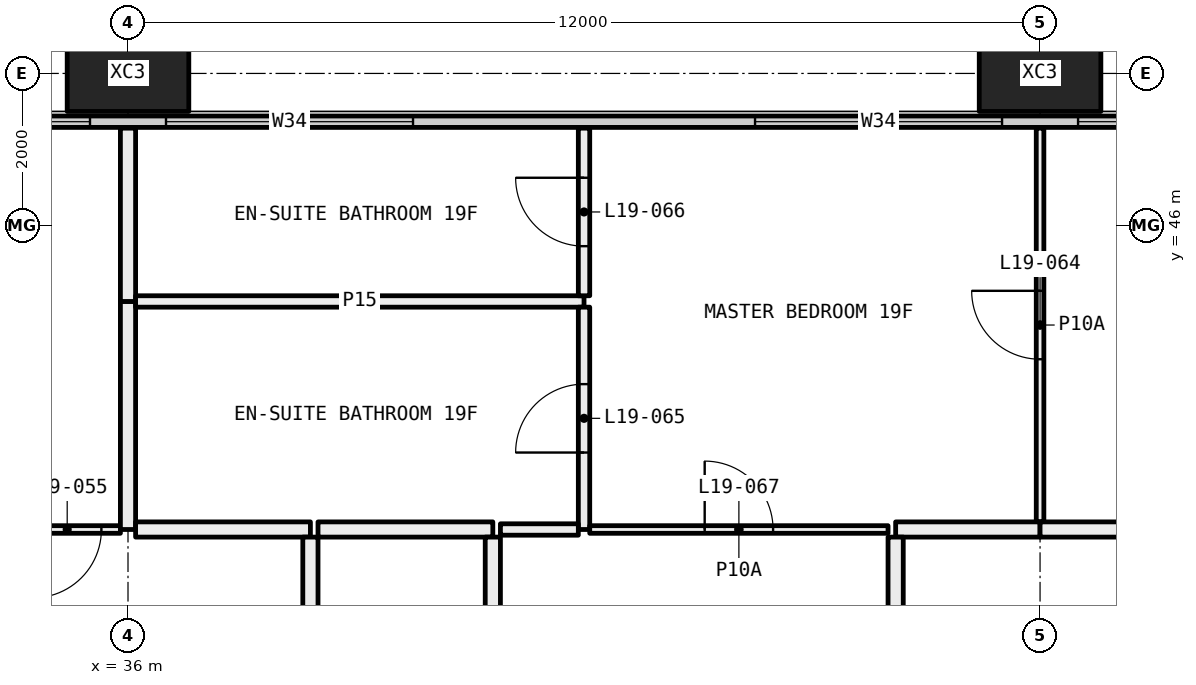
"""IFC4 building model, lengths in metres.
Left out: names, types, materials, properties, quantities, classifications, styles, units other than length and angle.
Written with IfcOpenShell. Run it as: python <this file> out.ifc"""

import sys

from ifc_helpers import new_model, si_unit, direction, frame, frame_2d, origin, origin_2d, place, context, subcontext, project, spatial, rectangle, hollow_rectangle, extrude, element, fill, save


model = new_model("IFC4")
c1 = context("Model", 3, precision=1e-05, world=origin(), true_north=direction((0.0, 1.0)))
c2 = subcontext(c1, "Body", "Model", "MODEL_VIEW")
j1 = project(units=[si_unit("LENGTHUNIT", "METRE"), si_unit("PLANEANGLEUNIT", "RADIAN")], contexts=[c1])
p1 = place(None, origin())
s1 = spatial("IfcSite", under=j1, at=p1, CompositionType="ELEMENT")
p2 = place(p1, origin())
s2 = spatial("IfcBuilding", under=s1, at=p2, CompositionType="ELEMENT")
p3 = place(p2, frame((0.0, 0.0, 78.3)))
s3 = spatial("IfcBuildingStorey", under=s2, at=p3, CompositionType="ELEMENT", Elevation=78.3)
for number, where, z_axis, x_axis in (
    (1, (36.0, 48.0, -0.4), (0.0, 0.0, 1.0), (1.0, 0.0, 0.0)),
    (2, (48.0, 48.0, -0.4), (0.0, 0.0, 1.0), (1.0, 0.0, 0.0)),
):
    element("IfcColumn", number, at=place(p3, frame(where, z_axis=z_axis, x_axis=x_axis)), inside=s3, PredefinedType="COLUMN", context=c2, shape_type="SweptSolid", body=[
        extrude(hollow_rectangle(XDim=1.6, YDim=1.0, WallThickness=0.065, at=origin_2d()), origin(), (0.0, 0.0, 1.0), 3.45),
    ])
p4 = place(p3, frame((6.56, 47.365, 0.0), z_axis=(0.0, 0.0, 1.0), x_axis=(1.0, 0.0, 0.0)))
e3 = element("IfcWall", 3, at=p4, inside=s3, PredefinedType="ELEMENTEDWALL", context=c2, shape_type="SweptSolid", body=[
    extrude(rectangle(XDim=58.88, YDim=0.15, at=frame_2d((29.44, 0.0))), origin(), (0.0, 0.0, 1.0), 3.05),
])
p5 = place(p4, frame((0.44, 0.0, 0.45)))
e4 = element("IfcOpeningElement", 4, at=p5, cuts=e3, PredefinedType="OPENING", context=c2, shape_type="SweptSolid", body=[
    extrude(rectangle(XDim=4.5, YDim=2.55, at=frame_2d((2.25, 1.275))), frame((0.0, 0.085, 0.0), z_axis=(0.0, -1.0, 0.0), x_axis=(1.0, 0.0, 0.0)), (0.0, 0.0, 1.0), 0.17),
])
p6 = place(p4, frame((5.94, 0.0, 0.45)))
e5 = element("IfcOpeningElement", 5, at=p6, cuts=e3, PredefinedType="OPENING", context=c2, shape_type="SweptSolid", body=[
    extrude(rectangle(XDim=3.25, YDim=2.55, at=frame_2d((1.625, 1.275))), frame((0.0, 0.085, 0.0), z_axis=(0.0, -1.0, 0.0), x_axis=(1.0, 0.0, 0.0)), (0.0, 0.0, 1.0), 0.17),
])
p7 = place(p4, frame((13.69, 0.0, 0.45)))
e6 = element("IfcOpeningElement", 6, at=p7, cuts=e3, PredefinedType="OPENING", context=c2, shape_type="SweptSolid", body=[
    extrude(rectangle(XDim=3.25, YDim=2.55, at=frame_2d((1.625, 1.275))), frame((0.0, 0.085, 0.0), z_axis=(0.0, -1.0, 0.0), x_axis=(1.0, 0.0, 0.0)), (0.0, 0.0, 1.0), 0.17),
])
p8 = place(p4, frame((17.94, 0.0, 0.45)))
e7 = element("IfcOpeningElement", 7, at=p8, cuts=e3, PredefinedType="OPENING", context=c2, shape_type="SweptSolid", body=[
    extrude(rectangle(XDim=3.25, YDim=2.55, at=frame_2d((1.625, 1.275))), frame((0.0, 0.085, 0.0), z_axis=(0.0, -1.0, 0.0), x_axis=(1.0, 0.0, 0.0)), (0.0, 0.0, 1.0), 0.17),
])
p9 = place(p4, frame((26.94, 0.0, 0.45)))
e8 = element("IfcOpeningElement", 8, at=p9, cuts=e3, PredefinedType="OPENING", context=c2, shape_type="SweptSolid", body=[
    extrude(rectangle(XDim=2.0, YDim=2.55, at=frame_2d((1.0, 1.275))), frame((0.0, 0.085, 0.0), z_axis=(0.0, -1.0, 0.0), x_axis=(1.0, 0.0, 0.0)), (0.0, 0.0, 1.0), 0.17),
])
p10 = place(p4, frame((29.94, 0.0, 0.45)))
e9 = element("IfcOpeningElement", 9, at=p10, cuts=e3, PredefinedType="OPENING", context=c2, shape_type="SweptSolid", body=[
    extrude(rectangle(XDim=3.25, YDim=2.55, at=frame_2d((1.625, 1.275))), frame((0.0, 0.085, 0.0), z_axis=(0.0, -1.0, 0.0), x_axis=(1.0, 0.0, 0.0)), (0.0, 0.0, 1.0), 0.17),
])
p11 = place(p4, frame((37.69, 0.0, 0.45)))
e10 = element("IfcOpeningElement", 10, at=p11, cuts=e3, PredefinedType="OPENING", context=c2, shape_type="SweptSolid", body=[
    extrude(rectangle(XDim=3.25, YDim=2.55, at=frame_2d((1.625, 1.275))), frame((0.0, 0.085, 0.0), z_axis=(0.0, -1.0, 0.0), x_axis=(1.0, 0.0, 0.0)), (0.0, 0.0, 1.0), 0.17),
])
p12 = place(p4, frame((41.94, 0.0, 0.45)))
e11 = element("IfcOpeningElement", 11, at=p12, cuts=e3, PredefinedType="OPENING", context=c2, shape_type="SweptSolid", body=[
    extrude(rectangle(XDim=3.25, YDim=2.55, at=frame_2d((1.625, 1.275))), frame((0.0, 0.085, 0.0), z_axis=(0.0, -1.0, 0.0), x_axis=(1.0, 0.0, 0.0)), (0.0, 0.0, 1.0), 0.17),
])
p13 = place(p4, frame((50.94, 0.0, 0.45)))
e12 = element("IfcOpeningElement", 12, at=p13, cuts=e3, PredefinedType="OPENING", context=c2, shape_type="SweptSolid", body=[
    extrude(rectangle(XDim=2.0, YDim=2.55, at=frame_2d((1.0, 1.275))), frame((0.0, 0.085, 0.0), z_axis=(0.0, -1.0, 0.0), x_axis=(1.0, 0.0, 0.0)), (0.0, 0.0, 1.0), 0.17),
])
p14 = place(p4, frame((53.94, 0.0, 0.45)))
e13 = element("IfcOpeningElement", 13, at=p14, cuts=e3, PredefinedType="OPENING", context=c2, shape_type="SweptSolid", body=[
    extrude(rectangle(XDim=4.5, YDim=2.55, at=frame_2d((2.25, 1.275))), frame((0.0, 0.085, 0.0), z_axis=(0.0, -1.0, 0.0), x_axis=(1.0, 0.0, 0.0)), (0.0, 0.0, 1.0), 0.17),
])
p15 = place(p3, frame((34.5, 42.0, 0.0), z_axis=(0.0, 0.0, 1.0), x_axis=(1.0, 0.0, 0.0)))
e14 = element("IfcWall", 14, at=p15, inside=s3, PredefinedType="PARTITIONING", context=c2, shape_type="SweptSolid", body=[
    extrude(rectangle(XDim=1.4, YDim=0.1, at=frame_2d((0.7, 0.0))), origin(), (0.0, 0.0, 1.0), 3.05),
])
p16 = place(p15, frame((0.25, 0.0, 0.0)))
e15 = element("IfcOpeningElement", 15, at=p16, cuts=e14, PredefinedType="OPENING", context=c2, shape_type="SweptSolid", body=[
    extrude(rectangle(XDim=0.9, YDim=2.1, at=frame_2d((0.45, 1.05))), frame((0.0, 0.06, 0.0), z_axis=(0.0, -1.0, 0.0), x_axis=(1.0, 0.0, 0.0)), (0.0, 0.0, 1.0), 0.12),
])
p17 = place(p3, frame((36.0, 42.0, 0.0), z_axis=(0.0, 0.0, 1.0), x_axis=(0.0, 1.0, 0.0)))
e16 = element("IfcWall", 16, at=p17, inside=s3, PredefinedType="PARTITIONING", context=c2, shape_type="SweptSolid", body=[
    extrude(rectangle(XDim=3.0, YDim=0.2, at=frame_2d((1.5, 0.0))), origin(), (0.0, 0.0, 1.0), 2.45),
])
p18 = place(p3, frame((36.0, 45.0, 0.0), z_axis=(0.0, 0.0, 1.0), x_axis=(0.0, 1.0, 0.0)))
e17 = element("IfcWall", 17, at=p18, inside=s3, PredefinedType="PARTITIONING", context=c2, shape_type="SweptSolid", body=[
    extrude(rectangle(XDim=2.28, YDim=0.2, at=frame_2d((1.14, 0.0))), origin(), (0.0, 0.0, 1.0), 2.45),
])
p19 = place(p3, frame((38.4, 42.0, 0.0), z_axis=(0.0, 0.0, 1.0), x_axis=(-1.0, 0.0, 0.0)))
e18 = element("IfcWall", 18, at=p19, inside=s3, PredefinedType="PARTITIONING", context=c2, shape_type="SweptSolid", body=[
    extrude(rectangle(XDim=2.3, YDim=0.2, at=frame_2d((1.15, 0.0))), origin(), (0.0, 0.0, 1.0), 3.05),
])
p20 = place(p3, frame((38.4, 36.1, 0.0), z_axis=(0.0, 0.0, 1.0), x_axis=(0.0, 1.0, 0.0)))
e19 = element("IfcWall", 19, at=p20, inside=s3, PredefinedType="PARTITIONING", context=c2, shape_type="SweptSolid", body=[
    extrude(rectangle(XDim=5.8, YDim=0.2, at=frame_2d((2.9, 0.0))), origin(), (0.0, 0.0, 1.0), 3.05),
])
p21 = place(p3, frame((42.0, 45.0, 0.0), z_axis=(0.0, 0.0, 1.0), x_axis=(-1.0, 0.0, 0.0)))
e20 = element("IfcWall", 20, at=p21, inside=s3, PredefinedType="PARTITIONING", context=c2, shape_type="SweptSolid", body=[
    extrude(rectangle(XDim=5.9, YDim=0.15, at=frame_2d((2.95, 0.0))), origin(), (0.0, 0.0, 1.0), 3.05),
])
p22 = place(p3, frame((42.0, 42.0, 0.0), z_axis=(0.0, 0.0, 1.0), x_axis=(0.0, 1.0, 0.0)))
e21 = element("IfcWall", 21, at=p22, inside=s3, PredefinedType="PARTITIONING", context=c2, shape_type="SweptSolid", body=[
    extrude(rectangle(XDim=2.925, YDim=0.15, at=frame_2d((1.462, 0.0))), origin(), (0.0, 0.0, 1.0), 3.05),
])
p23 = place(p22, frame((1.012, 0.0, 0.0)))
e22 = element("IfcOpeningElement", 22, at=p23, cuts=e21, PredefinedType="OPENING", context=c2, shape_type="SweptSolid", body=[
    extrude(rectangle(XDim=0.9, YDim=2.1, at=frame_2d((0.45, 1.05))), frame((0.0, 0.085, 0.0), z_axis=(0.0, -1.0, 0.0), x_axis=(1.0, 0.0, 0.0)), (0.0, 0.0, 1.0), 0.17),
])
p24 = place(p3, frame((40.9, 42.0, 0.0), z_axis=(0.0, 0.0, 1.0), x_axis=(1.0, 0.0, 0.0)))
e23 = element("IfcWall", 23, at=p24, inside=s3, PredefinedType="PARTITIONING", context=c2, shape_type="SweptSolid", body=[
    extrude(rectangle(XDim=1.025, YDim=0.15, at=frame_2d((0.513, 0.0))), origin(), (0.0, 0.0, 1.0), 3.05),
])
p25 = place(p3, frame((38.5, 42.0, 0.0), z_axis=(0.0, 0.0, 1.0), x_axis=(1.0, 0.0, 0.0)))
e24 = element("IfcWall", 24, at=p25, inside=s3, PredefinedType="PARTITIONING", context=c2, shape_type="SweptSolid", body=[
    extrude(rectangle(XDim=2.3, YDim=0.2, at=frame_2d((1.15, 0.0))), origin(), (0.0, 0.0, 1.0), 3.05),
])
p26 = place(p3, frame((42.0, 45.075, 0.0), z_axis=(0.0, 0.0, 1.0), x_axis=(0.0, 1.0, 0.0)))
e25 = element("IfcWall", 25, at=p26, inside=s3, PredefinedType="PARTITIONING", context=c2, shape_type="SweptSolid", body=[
    extrude(rectangle(XDim=2.205, YDim=0.15, at=frame_2d((1.103, 0.0))), origin(), (0.0, 0.0, 1.0), 3.05),
])
p27 = place(p26, frame((0.653, 0.0, 0.0)))
e26 = element("IfcOpeningElement", 26, at=p27, cuts=e25, PredefinedType="OPENING", context=c2, shape_type="SweptSolid", body=[
    extrude(rectangle(XDim=0.9, YDim=2.1, at=frame_2d((0.45, 1.05))), frame((0.0, 0.085, 0.0), z_axis=(0.0, -1.0, 0.0), x_axis=(1.0, 0.0, 0.0)), (0.0, 0.0, 1.0), 0.17),
])
p28 = place(p3, frame((48.0, 42.1, 0.0), z_axis=(0.0, 0.0, 1.0), x_axis=(0.0, 1.0, 0.0)))
e27 = element("IfcWall", 27, at=p28, inside=s3, PredefinedType="PARTITIONING", context=c2, shape_type="SweptSolid", body=[
    extrude(rectangle(XDim=5.18, YDim=0.1, at=frame_2d((2.59, 0.0))), origin(), (0.0, 0.0, 1.0), 3.05),
])
p29 = place(p28, frame((2.14, 0.0, 0.0)))
e28 = element("IfcOpeningElement", 28, at=p29, cuts=e27, PredefinedType="OPENING", context=c2, shape_type="SweptSolid", body=[
    extrude(rectangle(XDim=0.9, YDim=2.1, at=frame_2d((0.45, 1.05))), frame((0.0, 0.06, 0.0), z_axis=(0.0, -1.0, 0.0), x_axis=(1.0, 0.0, 0.0)), (0.0, 0.0, 1.0), 0.12),
])
p30 = place(p3, frame((42.075, 42.0, 0.0), z_axis=(0.0, 0.0, 1.0), x_axis=(1.0, 0.0, 0.0)))
e29 = element("IfcWall", 29, at=p30, inside=s3, PredefinedType="PARTITIONING", context=c2, shape_type="SweptSolid", body=[
    extrude(rectangle(XDim=3.925, YDim=0.1, at=frame_2d((1.962, 0.0))), origin(), (0.0, 0.0, 1.0), 3.05),
])
p31 = place(p30, frame((1.512, 0.0, 0.0)))
e30 = element("IfcOpeningElement", 30, at=p31, cuts=e29, PredefinedType="OPENING", context=c2, shape_type="SweptSolid", body=[
    extrude(rectangle(XDim=0.9, YDim=2.1, at=frame_2d((0.45, 1.05))), frame((0.0, 0.06, 0.0), z_axis=(0.0, -1.0, 0.0), x_axis=(1.0, 0.0, 0.0)), (0.0, 0.0, 1.0), 0.12),
])
p32 = place(p3, frame((46.1, 42.0, 0.0), z_axis=(0.0, 0.0, 1.0), x_axis=(1.0, 0.0, 0.0)))
e31 = element("IfcWall", 31, at=p32, inside=s3, PredefinedType="PARTITIONING", context=c2, shape_type="SweptSolid", body=[
    extrude(rectangle(XDim=1.9, YDim=0.2, at=frame_2d((0.95, 0.0))), origin(), (0.0, 0.0, 1.0), 3.05),
])
p33 = place(p3, frame((48.0, 42.0, 0.0), z_axis=(0.0, 0.0, 1.0), x_axis=(1.0, 0.0, 0.0)))
e32 = element("IfcWall", 32, at=p33, inside=s3, PredefinedType="PARTITIONING", context=c2, shape_type="SweptSolid", body=[
    extrude(rectangle(XDim=6.0, YDim=0.2, at=frame_2d((3.0, 0.0))), origin(), (0.0, 0.0, 1.0), 3.05),
])
p34 = place(p3, frame((40.8, 41.9, 0.0), z_axis=(0.0, 0.0, 1.0), x_axis=(0.0, -1.0, 0.0)))
e33 = element("IfcWall", 33, at=p34, inside=s3, PredefinedType="PARTITIONING", context=c2, shape_type="SweptSolid", body=[
    extrude(rectangle(XDim=6.2, YDim=0.2, at=frame_2d((3.1, 0.0))), origin(), (0.0, 0.0, 1.0), 2.45),
])
p35 = place(p3, frame((46.1, 36.1, 0.0), z_axis=(0.0, 0.0, 1.0), x_axis=(0.0, 1.0, 0.0)))
e34 = element("IfcWall", 34, at=p35, inside=s3, PredefinedType="PARTITIONING", context=c2, shape_type="SweptSolid", body=[
    extrude(rectangle(XDim=5.8, YDim=0.2, at=frame_2d((2.9, 0.0))), origin(), (0.0, 0.0, 1.0), 3.05),
])
p36 = place(p9, origin())
e35 = element("IfcWindow", 35, at=p36, inside=s3, PartitioningType="SINGLE_PANEL", PredefinedType="WINDOW", context=c2, shape_type="SweptSolid", body=[
    extrude(rectangle(XDim=2.0, YDim=2.55, at=frame_2d((1.0, 1.275))), frame((0.0, 0.03, 0.0), z_axis=(0.0, -1.0, 0.0), x_axis=(1.0, 0.0, 0.0)), (0.0, 0.0, 1.0), 0.06),
])
fill(e8, e35)
p37 = place(p10, origin())
e36 = element("IfcWindow", 36, at=p37, inside=s3, PartitioningType="SINGLE_PANEL", PredefinedType="WINDOW", context=c2, shape_type="SweptSolid", body=[
    extrude(rectangle(XDim=3.25, YDim=2.55, at=frame_2d((1.625, 1.275))), frame((0.0, 0.03, 0.0), z_axis=(0.0, -1.0, 0.0), x_axis=(1.0, 0.0, 0.0)), (0.0, 0.0, 1.0), 0.06),
])
fill(e9, e36)
p38 = place(p11, origin())
e37 = element("IfcWindow", 37, at=p38, inside=s3, PartitioningType="SINGLE_PANEL", PredefinedType="WINDOW", context=c2, shape_type="SweptSolid", body=[
    extrude(rectangle(XDim=3.25, YDim=2.55, at=frame_2d((1.625, 1.275))), frame((0.0, 0.03, 0.0), z_axis=(0.0, -1.0, 0.0), x_axis=(1.0, 0.0, 0.0)), (0.0, 0.0, 1.0), 0.06),
])
fill(e10, e37)
p39 = place(p12, origin())
e38 = element("IfcWindow", 38, at=p39, inside=s3, PartitioningType="SINGLE_PANEL", PredefinedType="WINDOW", context=c2, shape_type="SweptSolid", body=[
    extrude(rectangle(XDim=3.25, YDim=2.55, at=frame_2d((1.625, 1.275))), frame((0.0, 0.03, 0.0), z_axis=(0.0, -1.0, 0.0), x_axis=(1.0, 0.0, 0.0)), (0.0, 0.0, 1.0), 0.06),
])
fill(e11, e38)
p40 = place(p16, frame((0.9, 0.0, 0.0), x_axis=(-1.0, 0.0, 0.0)))
e39 = element("IfcDoor", 39, at=p40, inside=s3, OperationType="SINGLE_SWING_LEFT", PredefinedType="DOOR", context=c2, shape_type="SweptSolid", body=[
    extrude(rectangle(XDim=0.9, YDim=2.1, at=frame_2d((0.45, 1.05))), frame((0.0, 0.025, 0.0), z_axis=(0.0, -1.0, 0.0), x_axis=(1.0, 0.0, 0.0)), (0.0, 0.0, 1.0), 0.05),
])
fill(e15, e39)
p41 = place(p29, origin())
e40 = element("IfcDoor", 40, at=p41, inside=s3, OperationType="SINGLE_SWING_LEFT", PredefinedType="DOOR", context=c2, shape_type="SweptSolid", body=[
    extrude(rectangle(XDim=0.9, YDim=2.1, at=frame_2d((0.45, 1.05))), frame((0.0, 0.025, 0.0), z_axis=(0.0, -1.0, 0.0), x_axis=(1.0, 0.0, 0.0)), (0.0, 0.0, 1.0), 0.05),
])
fill(e28, e40)
p42 = place(p23, origin())
e41 = element("IfcDoor", 41, at=p42, inside=s3, OperationType="SINGLE_SWING_RIGHT", PredefinedType="DOOR", context=c2, shape_type="SweptSolid", body=[
    extrude(rectangle(XDim=0.9, YDim=2.1, at=frame_2d((0.45, 1.05))), frame((0.0, 0.025, 0.0), z_axis=(0.0, -1.0, 0.0), x_axis=(1.0, 0.0, 0.0)), (0.0, 0.0, 1.0), 0.05),
])
fill(e22, e41)
p43 = place(p27, origin())
e42 = element("IfcDoor", 42, at=p43, inside=s3, OperationType="SINGLE_SWING_LEFT", PredefinedType="DOOR", context=c2, shape_type="SweptSolid", body=[
    extrude(rectangle(XDim=0.9, YDim=2.1, at=frame_2d((0.45, 1.05))), frame((0.0, 0.025, 0.0), z_axis=(0.0, -1.0, 0.0), x_axis=(1.0, 0.0, 0.0)), (0.0, 0.0, 1.0), 0.05),
])
fill(e26, e42)
p44 = place(p31, origin())
e43 = element("IfcDoor", 43, at=p44, inside=s3, OperationType="SINGLE_SWING_RIGHT", PredefinedType="DOOR", context=c2, shape_type="SweptSolid", body=[
    extrude(rectangle(XDim=0.9, YDim=2.1, at=frame_2d((0.45, 1.05))), frame((0.0, 0.025, 0.0), z_axis=(0.0, -1.0, 0.0), x_axis=(1.0, 0.0, 0.0)), (0.0, 0.0, 1.0), 0.05),
])
fill(e30, e43)
save(model, sys.argv[1])
